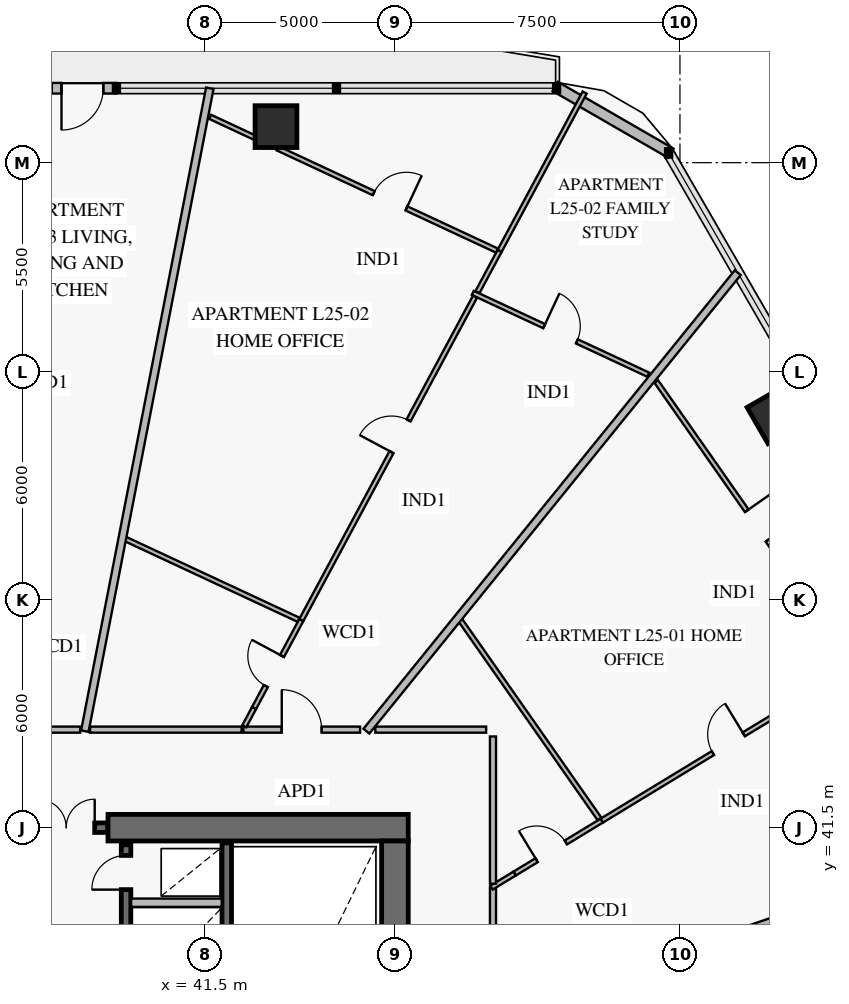
"""IFC4 building model, lengths in metres.
Left out: names, types, materials, properties, quantities, classifications, styles, units other than length and angle.
Written with IfcOpenShell. Run it as: python <this file> out.ifc"""

import sys

from ifc_helpers import new_model, si_unit, direction, frame, frame_2d, origin, origin_2d, place, context, subcontext, project, spatial, rectangle, extrude, element, fill, save


model = new_model("IFC4")
c1 = context("Model", 3, precision=1e-05, world=origin(), true_north=direction((0.0, 1.0)))
c2 = subcontext(c1, "Body", "Model", "MODEL_VIEW")
j1 = project(units=[si_unit("LENGTHUNIT", "METRE"), si_unit("PLANEANGLEUNIT", "RADIAN")], contexts=[c1])
p1 = place(None, origin())
s1 = spatial("IfcSite", under=j1, at=p1, CompositionType="ELEMENT")
p2 = place(p1, origin())
s2 = spatial("IfcBuilding", under=s1, at=p2, CompositionType="ELEMENT")
p3 = place(p2, frame((0.0, 0.0, 103.8)))
s3 = spatial("IfcBuildingStorey", under=s2, at=p3, CompositionType="ELEMENT", Elevation=103.8)
p4 = place(p3, frame((46.85, 41.5, 0.0), z_axis=(0.0, 0.0, 1.0), x_axis=(-1.0, 0.0, 0.0)))
e1 = element("IfcWall", 1, at=p4, inside=s3, PredefinedType="SHEAR", context=c2, shape_type="SweptSolid", body=[
    extrude(rectangle(XDim=7.9, YDim=0.7, at=frame_2d((3.95, 0.0))), origin(), (0.0, 0.0, 1.0), 3.8),
])
p5 = place(p3, frame((46.5, 22.85, 0.0), z_axis=(0.0, 0.0, 1.0), x_axis=(0.0, 1.0, 0.0)))
e2 = element("IfcWall", 2, at=p5, inside=s3, PredefinedType="SHEAR", context=c2, shape_type="SweptSolid", body=[
    extrude(rectangle(XDim=18.3, YDim=0.7, at=frame_2d((9.15, 0.0))), origin(), (0.0, 0.0, 1.0), 3.8),
])
p6 = place(p5, frame((8.9, 0.0, 0.0)))
e3 = element("IfcOpeningElement", 3, at=p6, cuts=e2, PredefinedType="OPENING", context=c2, shape_type="SweptSolid", body=[
    extrude(rectangle(XDim=1.1, YDim=2.15, at=frame_2d((0.55, 1.075))), frame((0.0, 0.362, 0.0), z_axis=(0.0, -1.0, 0.0), x_axis=(1.0, 0.0, 0.0)), (0.0, 0.0, 1.0), 0.724),
])
for number, where, z_axis, x_axis in (
    (4, (56.519, 52.357, 0.0), (0.0, 0.0, 1.0), (-0.5, 0.866, 0.0)),
    (5, (43.37, 59.948, 0.0), (0.0, 0.0, 1.0), (-1.0, 0.0, 0.0)),
):
    element("IfcColumn", number, at=place(p3, frame(where, z_axis=z_axis, x_axis=x_axis)), inside=s3, PredefinedType="COLUMN", context=c2, shape_type="SweptSolid", body=[
        extrude(rectangle(XDim=1.1, YDim=1.1, at=origin_2d()), origin(), (0.0, 0.0, 1.0), 3.55),
    ])
p7 = place(p3, frame((37.381, 60.958, 0.0), z_axis=(0.0, 0.0, 1.0), x_axis=(1.0, 0.0, 0.0)))
e6 = element("IfcWall", 6, at=p7, inside=s3, PredefinedType="SOLIDWALL", context=c2, shape_type="SweptSolid", body=[
    extrude(rectangle(XDim=1.79, YDim=0.28, at=frame_2d((0.895, 0.0))), origin(), (0.0, 0.0, 1.0), 3.55),
])
p8 = place(p7, frame((0.345, 0.0, 0.0)))
e7 = element("IfcOpeningElement", 7, at=p8, cuts=e6, PredefinedType="OPENING", context=c2, shape_type="SweptSolid", body=[
    extrude(rectangle(XDim=1.1, YDim=2.2, at=frame_2d((0.55, 1.1))), frame((0.0, 0.152, 0.0), z_axis=(0.0, -1.0, 0.0), x_axis=(1.0, 0.0, 0.0)), (0.0, 0.0, 1.0), 0.304),
])
p9 = place(p3, frame((50.717, 61.006, 0.0), z_axis=(0.0, 0.0, 1.0), x_axis=(0.866007452331, -0.500031091541, 0.0)))
e8 = element("IfcWall", 8, at=p9, inside=s3, PredefinedType="SOLIDWALL", context=c2, shape_type="SweptSolid", body=[
    extrude(rectangle(XDim=3.515, YDim=0.28, at=frame_2d((1.757, 0.0))), origin(), (0.0, 0.0, 1.0), 3.55),
])
p10 = place(p3, frame((36.76, 41.5, 0.0), z_axis=(0.0, 0.0, 1.0), x_axis=(1.0, 0.0, 0.0)))
e9 = element("IfcWall", 9, at=p10, inside=s3, PredefinedType="SOLIDWALL", context=c2, shape_type="SweptSolid", body=[
    extrude(rectangle(XDim=2.18, YDim=0.25, at=frame_2d((1.09, 0.0))), origin(), (0.0, 0.0, 1.0), 3.8),
])
p11 = place(p10, frame((0.34, 0.0, 0.0)))
e10 = element("IfcOpeningElement", 10, at=p11, cuts=e9, PredefinedType="OPENING", context=c2, shape_type="SweptSolid", body=[
    extrude(rectangle(XDim=1.5, YDim=2.15, at=frame_2d((0.75, 1.075))), frame((0.0, 0.137, 0.0), z_axis=(0.0, -1.0, 0.0), x_axis=(1.0, 0.0, 0.0)), (0.0, 0.0, 1.0), 0.274),
])
p12 = place(p3, frame((42.075, 31.4, 0.0), z_axis=(0.0, 0.0, 1.0), x_axis=(0.0, 1.0, 0.0)))
e11 = element("IfcWall", 11, at=p12, inside=s3, PredefinedType="SOLIDWALL", context=c2, shape_type="SweptSolid", body=[
    extrude(rectangle(XDim=9.7, YDim=0.25, at=frame_2d((4.85, 0.0))), origin(), (0.0, 0.0, 1.0), 3.8),
])
p13 = place(p3, frame((39.425, 31.4, 0.0), z_axis=(0.0, 0.0, 1.0), x_axis=(0.0, 1.0, 0.0)))
e12 = element("IfcWall", 12, at=p13, inside=s3, PredefinedType="SOLIDWALL", context=c2, shape_type="SweptSolid", body=[
    extrude(rectangle(XDim=9.65, YDim=0.25, at=frame_2d((4.825, 0.0))), origin(), (0.0, 0.0, 1.0), 3.8),
])
p14 = place(p13, frame((8.47, 0.0, 0.0)))
e13 = element("IfcOpeningElement", 13, at=p14, cuts=e12, PredefinedType="OPENING", context=c2, shape_type="SweptSolid", body=[
    extrude(rectangle(XDim=0.9, YDim=2.1, at=frame_2d((0.45, 1.05))), frame((0.0, 0.137, 0.0), z_axis=(0.0, -1.0, 0.0), x_axis=(1.0, 0.0, 0.0)), (0.0, 0.0, 1.0), 0.274),
])
p15 = place(p3, frame((49.65, 40.293, 0.0), z_axis=(0.0, 0.0, 1.0), x_axis=(0.854654905255, 0.519196487781, 0.0)))
e14 = element("IfcWall", 14, at=p15, inside=s3, PredefinedType="PARTITIONING", context=c2, shape_type="SweptSolid", body=[
    extrude(rectangle(XDim=2.684, YDim=0.12, at=frame_2d((1.342, 0.0))), origin(), (0.0, 0.0, 1.0), 3.55),
])
p16 = place(p15, frame((0.677, 0.0, 0.0)))
e15 = element("IfcOpeningElement", 15, at=p16, cuts=e14, PredefinedType="OPENING", context=c2, shape_type="SweptSolid", body=[
    extrude(rectangle(XDim=0.9, YDim=2.1, at=frame_2d((0.45, 1.05))), frame((0.0, 0.072, 0.0), z_axis=(0.0, -1.0, 0.0), x_axis=(1.0, 0.0, 0.0)), (0.0, 0.0, 1.0), 0.144),
])
p17 = place(p3, frame((51.944, 41.686, 0.0), z_axis=(0.0, 0.0, 1.0), x_axis=(0.854642479396, 0.519216941569, 0.0)))
e16 = element("IfcWall", 16, at=p17, inside=s3, PredefinedType="PARTITIONING", context=c2, shape_type="SweptSolid", body=[
    extrude(rectangle(XDim=7.843, YDim=0.12, at=frame_2d((3.921, 0.0))), origin(), (0.0, 0.0, 1.0), 3.1),
])
p18 = place(p17, frame((3.421, 0.0, 0.0)))
e17 = element("IfcOpeningElement", 17, at=p18, cuts=e16, PredefinedType="OPENING", context=c2, shape_type="SweptSolid", body=[
    extrude(rectangle(XDim=0.95, YDim=2.1, at=frame_2d((0.475, 1.05))), frame((0.0, 0.072, 0.0), z_axis=(0.0, -1.0, 0.0), x_axis=(1.0, 0.0, 0.0)), (0.0, 0.0, 1.0), 0.144),
])
p19 = place(p3, frame((58.586, 45.801, 0.0), z_axis=(0.0, 0.0, 1.0), x_axis=(-0.573574227098, 0.81915359122, 0.0)))
e18 = element("IfcWall", 18, at=p19, inside=s3, PredefinedType="PARTITIONING", context=c2, shape_type="SweptSolid", body=[
    extrude(rectangle(XDim=9.08, YDim=0.12, at=frame_2d((4.54, 0.0))), origin(), (0.0, 0.0, 1.0), 2.85),
])
p20 = place(p19, frame((3.98, 0.0, 0.0)))
e19 = element("IfcOpeningElement", 19, at=p20, cuts=e18, PredefinedType="OPENING", context=c2, shape_type="SweptSolid", body=[
    extrude(rectangle(XDim=0.95, YDim=2.1, at=frame_2d((0.475, 1.05))), frame((0.0, 0.072, 0.0), z_axis=(0.0, -1.0, 0.0), x_axis=(1.0, 0.0, 0.0)), (0.0, 0.0, 1.0), 0.144),
])
p21 = place(p3, frame((49.08, 36.653, 0.0), z_axis=(0.0, 0.0, 1.0), x_axis=(0.0, 1.0, 0.0)))
e20 = element("IfcWall", 20, at=p21, inside=s3, PredefinedType="PARTITIONING", context=c2, shape_type="SweptSolid", body=[
    extrude(rectangle(XDim=3.27, YDim=0.16, at=frame_2d((1.635, 0.0))), origin(), (0.0, 0.0, 1.0), 3.55),
])
p22 = place(p21, frame((1.11, 0.0, 0.0)))
e21 = element("IfcOpeningElement", 21, at=p22, cuts=e20, PredefinedType="OPENING", context=c2, shape_type="SweptSolid", body=[
    extrude(rectangle(XDim=1.05, YDim=2.15, at=frame_2d((0.525, 1.075))), frame((0.0, 0.092, 0.0), z_axis=(0.0, -1.0, 0.0), x_axis=(1.0, 0.0, 0.0)), (0.0, 0.0, 1.0), 0.184),
])
p23 = place(p3, frame((53.166, 53.42, 0.0), z_axis=(0.0, 0.0, 1.0), x_axis=(-0.906301834907, 0.422631025889, 0.0)))
e22 = element("IfcWall", 22, at=p23, inside=s3, PredefinedType="PARTITIONING", context=c2, shape_type="SweptSolid", body=[
    extrude(rectangle(XDim=5.096, YDim=0.12, at=frame_2d((2.548, 0.0))), origin(), (0.0, 0.0, 1.0), 3.55),
])
p24 = place(p23, frame((2.073, 0.0, 0.0)))
e23 = element("IfcOpeningElement", 23, at=p24, cuts=e22, PredefinedType="OPENING", context=c2, shape_type="SweptSolid", body=[
    extrude(rectangle(XDim=0.95, YDim=2.1, at=frame_2d((0.475, 1.05))), frame((0.0, 0.072, 0.0), z_axis=(0.0, -1.0, 0.0), x_axis=(1.0, 0.0, 0.0)), (0.0, 0.0, 1.0), 0.144),
])
p25 = place(p3, frame((42.794, 44.65, 0.0), z_axis=(0.0, 0.0, 1.0), x_axis=(0.473152013486, 0.880980801229, 0.0)))
e24 = element("IfcWall", 24, at=p25, inside=s3, PredefinedType="PARTITIONING", context=c2, shape_type="SweptSolid", body=[
    extrude(rectangle(XDim=2.627, YDim=0.12, at=frame_2d((1.314, 0.0))), origin(), (0.0, 0.0, 1.0), 3.55),
])
p26 = place(p25, frame((0.654, 0.0, 0.0)))
e25 = element("IfcOpeningElement", 25, at=p26, cuts=e24, PredefinedType="OPENING", context=c2, shape_type="SweptSolid", body=[
    extrude(rectangle(XDim=0.9, YDim=2.1, at=frame_2d((0.45, 1.05))), frame((0.0, 0.072, 0.0), z_axis=(0.0, -1.0, 0.0), x_axis=(1.0, 0.0, 0.0)), (0.0, 0.0, 1.0), 0.144),
])
p27 = place(p3, frame((44.038, 46.965, 0.0), z_axis=(0.0, 0.0, 1.0), x_axis=(0.473145171057, 0.880984476086, 0.0)))
e26 = element("IfcWall", 26, at=p27, inside=s3, PredefinedType="PARTITIONING", context=c2, shape_type="SweptSolid", body=[
    extrude(rectangle(XDim=9.656, YDim=0.12, at=frame_2d((4.828, 0.0))), origin(), (0.0, 0.0, 1.0), 3.1),
])
p28 = place(p27, frame((5.014, 0.0, 0.0)))
e27 = element("IfcOpeningElement", 27, at=p28, cuts=e26, PredefinedType="OPENING", context=c2, shape_type="SweptSolid", body=[
    extrude(rectangle(XDim=0.95, YDim=2.1, at=frame_2d((0.475, 1.05))), frame((0.0, 0.072, 0.0), z_axis=(0.0, -1.0, 0.0), x_axis=(1.0, 0.0, 0.0)), (0.0, 0.0, 1.0), 0.144),
])
p29 = place(p3, frame((48.671, 55.592, 0.0), z_axis=(0.0, 0.0, 1.0), x_axis=(0.473251547015, 0.880927337099, 0.0)))
e28 = element("IfcWall", 28, at=p29, inside=s3, PredefinedType="PARTITIONING", context=c2, shape_type="SweptSolid", body=[
    extrude(rectangle(XDim=1.236, YDim=0.12, at=frame_2d((0.618, 0.0))), origin(), (0.0, 0.0, 1.0), 2.8),
])
p30 = place(p3, frame((49.182, 56.687, 0.0), z_axis=(0.0, 0.0, 1.0), x_axis=(-0.906301625288, 0.422631475402, 0.0)))
e29 = element("IfcWall", 29, at=p30, inside=s3, PredefinedType="PARTITIONING", context=c2, shape_type="SweptSolid", body=[
    extrude(rectangle(XDim=6.368, YDim=0.12, at=frame_2d((3.184, 0.0))), origin(), (0.0, 0.0, 1.0), 2.8),
])
p31 = place(p30, frame((2.625, 0.0, 0.0)))
e30 = element("IfcOpeningElement", 30, at=p31, cuts=e29, PredefinedType="OPENING", context=c2, shape_type="SweptSolid", body=[
    extrude(rectangle(XDim=0.95, YDim=2.1, at=frame_2d((0.475, 1.05))), frame((0.0, 0.072, 0.0), z_axis=(0.0, -1.0, 0.0), x_axis=(1.0, 0.0, 0.0)), (0.0, 0.0, 1.0), 0.144),
])
p32 = place(p3, frame((45.583, 44.08, 0.0), z_axis=(0.0, 0.0, 1.0), x_axis=(-1.0, 0.0, 0.0)))
e31 = element("IfcWall", 31, at=p32, inside=s3, PredefinedType="PARTITIONING", context=c2, shape_type="SweptSolid", body=[
    extrude(rectangle(XDim=3.073, YDim=0.16, at=frame_2d((1.536, 0.0))), origin(), (0.0, 0.0, 1.0), 3.55),
])
p33 = place(p32, frame((1.011, 0.0, 0.0)))
e32 = element("IfcOpeningElement", 32, at=p33, cuts=e31, PredefinedType="OPENING", context=c2, shape_type="SweptSolid", body=[
    extrude(rectangle(XDim=1.05, YDim=2.15, at=frame_2d((0.525, 1.075))), frame((0.0, 0.092, 0.0), z_axis=(0.0, -1.0, 0.0), x_axis=(1.0, 0.0, 0.0)), (0.0, 0.0, 1.0), 0.184),
])
p34 = place(p3, frame((38.219, 44.08, 0.0), z_axis=(0.0, 0.0, 1.0), x_axis=(-1.0, 0.0, 0.0)))
e33 = element("IfcWall", 33, at=p34, inside=s3, PredefinedType="PARTITIONING", context=c2, shape_type="SweptSolid", body=[
    extrude(rectangle(XDim=2.629, YDim=0.16, at=frame_2d((1.314, 0.0))), origin(), (0.0, 0.0, 1.0), 3.55),
])
p35 = place(p34, frame((0.79, 0.0, 0.0)))
e34 = element("IfcOpeningElement", 34, at=p35, cuts=e33, PredefinedType="OPENING", context=c2, shape_type="SweptSolid", body=[
    extrude(rectangle(XDim=1.05, YDim=2.15, at=frame_2d((0.525, 1.075))), frame((0.0, 0.092, 0.0), z_axis=(0.0, -1.0, 0.0), x_axis=(1.0, 0.0, 0.0)), (0.0, 0.0, 1.0), 0.184),
])
p36 = place(p3, frame((39.558, 39.525, 0.0), z_axis=(0.0, 0.0, 1.0), x_axis=(1.0, 0.0, 0.0)))
e35 = element("IfcWall", 35, at=p36, inside=s3, PredefinedType="PARTITIONING", context=c2, shape_type="SweptSolid", body=[
    extrude(rectangle(XDim=2.384, YDim=0.22, at=frame_2d((1.192, 0.0))), origin(), (0.0, 0.0, 1.0), 3.55),
])
p37 = place(p3, frame((49.04, 36.49, 0.0), z_axis=(0.0, 0.0, 1.0), x_axis=(0.945516411569, 0.325574439191, 0.0)))
e36 = element("IfcWall", 36, at=p37, inside=s3, PredefinedType="PARTITIONING", context=c2, shape_type="SweptSolid", body=[
    extrude(rectangle(XDim=15.709, YDim=0.2, at=frame_2d((7.854, 0.0))), origin(), (0.0, 0.0, 1.0), 2.8),
])
p38 = place(p3, frame((49.042, 39.923, 0.0), z_axis=(0.0, 0.0, 1.0), x_axis=(0.854635339674, 0.519228693526, 0.0)))
e37 = element("IfcWall", 37, at=p38, inside=s3, PredefinedType="PARTITIONING", context=c2, shape_type="SweptSolid", body=[
    extrude(rectangle(XDim=0.712, YDim=0.12, at=frame_2d((0.356, 0.0))), origin(), (0.0, 0.0, 1.0), 3.55),
])
p39 = place(p3, frame((51.884, 41.729, 0.0), z_axis=(0.0, 0.0, 1.0), x_axis=(-0.573595462393, 0.819138721782, 0.0)))
e38 = element("IfcWall", 38, at=p39, inside=s3, PredefinedType="PARTITIONING", context=c2, shape_type="SweptSolid", body=[
    extrude(rectangle(XDim=6.4, YDim=0.12, at=frame_2d((3.2, 0.0))), origin(), (0.0, 0.0, 1.0), 2.85),
])
p40 = place(p3, frame((45.75, 44.04, 0.0), z_axis=(0.0, 0.0, 1.0), x_axis=(0.629320806321, 0.777145625177, 0.0)))
e39 = element("IfcWall", 39, at=p40, inside=s3, PredefinedType="PARTITIONING", context=c2, shape_type="SweptSolid", body=[
    extrude(rectangle(XDim=15.526, YDim=0.2, at=frame_2d((7.763, 0.0))), origin(), (0.0, 0.0, 1.0), 2.8),
])
p41 = place(p3, frame((42.535, 44.168, 0.0), z_axis=(0.0, 0.0, 1.0), x_axis=(0.473088148205, 0.881015098638, 0.0)))
e40 = element("IfcWall", 40, at=p41, inside=s3, PredefinedType="PARTITIONING", context=c2, shape_type="SweptSolid", body=[
    extrude(rectangle(XDim=0.547, YDim=0.12, at=frame_2d((0.273, 0.0))), origin(), (0.0, 0.0, 1.0), 3.55),
])
p42 = place(p3, frame((49.256, 56.681, 0.0), z_axis=(0.0, 0.0, 1.0), x_axis=(0.473160047709, 0.880976486209, 0.0)))
e41 = element("IfcWall", 41, at=p42, inside=s3, PredefinedType="PARTITIONING", context=c2, shape_type="SweptSolid", body=[
    extrude(rectangle(XDim=4.726, YDim=0.12, at=frame_2d((2.363, 0.0))), origin(), (0.0, 0.0, 1.0), 3.55),
])
p43 = place(p3, frame((43.964, 46.971, 0.0), z_axis=(0.0, 0.0, 1.0), x_axis=(-0.906312552641, 0.422608041719, 0.0)))
e42 = element("IfcWall", 42, at=p43, inside=s3, PredefinedType="PARTITIONING", context=c2, shape_type="SweptSolid", body=[
    extrude(rectangle(XDim=5.059, YDim=0.12, at=frame_2d((2.529, 0.0))), origin(), (0.0, 0.0, 1.0), 2.85),
])
p44 = place(p3, frame((42.8, 59.664, 0.0), z_axis=(0.0, 0.0, 1.0), x_axis=(-0.906338544202, 0.42255229652, 0.0)))
e43 = element("IfcWall", 43, at=p44, inside=s3, PredefinedType="PARTITIONING", context=c2, shape_type="SweptSolid", body=[
    extrude(rectangle(XDim=1.284, YDim=0.12, at=frame_2d((0.642, 0.0))), origin(), (0.0, 0.0, 1.0), 2.8),
])
p45 = place(p3, frame((38.34, 44.04, 0.0), z_axis=(0.0, 0.0, 1.0), x_axis=(0.190806720502, 0.981627625636, 0.0)))
e44 = element("IfcWall", 44, at=p45, inside=s3, PredefinedType="PARTITIONING", context=c2, shape_type="SweptSolid", body=[
    extrude(rectangle(XDim=17.235, YDim=0.2, at=frame_2d((8.618, 0.0))), origin(), (0.0, 0.0, 1.0), 2.8),
])
p46 = place(p3, frame((49.08, 40.026, 0.0), z_axis=(0.0, 0.0, 1.0), x_axis=(0.0, 1.0, 0.0)))
e45 = element("IfcWall", 45, at=p46, inside=s3, PredefinedType="PARTITIONING", context=c2, shape_type="SweptSolid", body=[
    extrude(rectangle(XDim=3.874, YDim=0.16, at=frame_2d((1.937, 0.0))), origin(), (0.0, 0.0, 1.0), 3.55),
])
p47 = place(p3, frame((48.9, 44.08, 0.0), z_axis=(0.0, 0.0, 1.0), x_axis=(-1.0, 0.0, 0.0)))
e46 = element("IfcWall", 46, at=p47, inside=s3, PredefinedType="PARTITIONING", context=c2, shape_type="SweptSolid", body=[
    extrude(rectangle(XDim=2.916, YDim=0.16, at=frame_2d((1.458, 0.0))), origin(), (0.0, 0.0, 1.0), 2.85),
])
p48 = place(p3, frame((42.465, 44.08, 0.0), z_axis=(0.0, 0.0, 1.0), x_axis=(-1.0, 0.0, 0.0)))
e47 = element("IfcWall", 47, at=p48, inside=s3, PredefinedType="PARTITIONING", context=c2, shape_type="SweptSolid", body=[
    extrude(rectangle(XDim=3.987, YDim=0.16, at=frame_2d((1.994, 0.0))), origin(), (0.0, 0.0, 1.0), 2.85),
])
p49 = place(p8, frame((1.1, 0.0, 0.0), z_axis=(0.0, 0.0, 1.0), x_axis=(-1.0, 0.0, 0.0)))
e48 = element("IfcDoor", 48, at=p49, inside=s3, OperationType="SINGLE_SWING_RIGHT", PredefinedType="DOOR", context=c2, shape_type="SweptSolid", body=[
    extrude(rectangle(XDim=1.1, YDim=2.2, at=frame_2d((0.55, 1.1))), frame((0.0, 0.025, 0.0), z_axis=(0.0, -1.0, 0.0), x_axis=(1.0, 0.0, 0.0)), (0.0, 0.0, 1.0), 0.05),
])
fill(e7, e48)
p50 = place(p11, origin())
e49 = element("IfcDoor", 49, at=p50, inside=s3, OperationType="DOUBLE_DOOR_SINGLE_SWING", PredefinedType="DOOR", context=c2, shape_type="SweptSolid", body=[
    extrude(rectangle(XDim=1.5, YDim=2.15, at=frame_2d((0.75, 1.075))), frame((0.0, 0.025, 0.0), z_axis=(0.0, -1.0, 0.0), x_axis=(1.0, 0.0, 0.0)), (0.0, 0.0, 1.0), 0.05),
])
fill(e10, e49)
p51 = place(p14, origin())
e50 = element("IfcDoor", 50, at=p51, inside=s3, OperationType="SINGLE_SWING_LEFT", PredefinedType="DOOR", context=c2, shape_type="SweptSolid", body=[
    extrude(rectangle(XDim=0.9, YDim=2.1, at=frame_2d((0.45, 1.05))), frame((0.0, 0.025, 0.0), z_axis=(0.0, -1.0, 0.0), x_axis=(1.0, 0.0, 0.0)), (0.0, 0.0, 1.0), 0.05),
])
fill(e13, e50)
p52 = place(p16, origin())
e51 = element("IfcDoor", 51, at=p52, inside=s3, OperationType="SINGLE_SWING_LEFT", PredefinedType="DOOR", context=c2, shape_type="SweptSolid", body=[
    extrude(rectangle(XDim=0.9, YDim=2.1, at=frame_2d((0.45, 1.05))), frame((0.0, 0.025, 0.0), z_axis=(0.0, -1.0, 0.0), x_axis=(1.0, 0.0, 0.0)), (0.0, 0.0, 1.0), 0.05),
])
fill(e15, e51)
p53 = place(p18, origin())
e52 = element("IfcDoor", 52, at=p53, inside=s3, OperationType="SINGLE_SWING_RIGHT", PredefinedType="DOOR", context=c2, shape_type="SweptSolid", body=[
    extrude(rectangle(XDim=0.95, YDim=2.1, at=frame_2d((0.475, 1.05))), frame((0.0, 0.025, 0.0), z_axis=(0.0, -1.0, 0.0), x_axis=(1.0, 0.0, 0.0)), (0.0, 0.0, 1.0), 0.05),
])
fill(e17, e52)
p54 = place(p20, frame((0.95, 0.0, 0.0), z_axis=(0.0, 0.0, 1.0), x_axis=(-1.0, 0.0, 0.0)))
e53 = element("IfcDoor", 53, at=p54, inside=s3, OperationType="SINGLE_SWING_LEFT", PredefinedType="DOOR", context=c2, shape_type="SweptSolid", body=[
    extrude(rectangle(XDim=0.95, YDim=2.1, at=frame_2d((0.475, 1.05))), frame((0.0, 0.025, 0.0), z_axis=(0.0, -1.0, 0.0), x_axis=(1.0, 0.0, 0.0)), (0.0, 0.0, 1.0), 0.05),
])
fill(e19, e53)
p55 = place(p24, frame((0.95, 0.0, 0.0), z_axis=(0.0, 0.0, 1.0), x_axis=(-1.0, 0.0, 0.0)))
e54 = element("IfcDoor", 54, at=p55, inside=s3, OperationType="SINGLE_SWING_LEFT", PredefinedType="DOOR", context=c2, shape_type="SweptSolid", body=[
    extrude(rectangle(XDim=0.95, YDim=2.1, at=frame_2d((0.475, 1.05))), frame((0.0, 0.025, 0.0), z_axis=(0.0, -1.0, 0.0), x_axis=(1.0, 0.0, 0.0)), (0.0, 0.0, 1.0), 0.05),
])
fill(e23, e54)
p56 = place(p26, origin())
e55 = element("IfcDoor", 55, at=p56, inside=s3, OperationType="SINGLE_SWING_RIGHT", PredefinedType="DOOR", context=c2, shape_type="SweptSolid", body=[
    extrude(rectangle(XDim=0.9, YDim=2.1, at=frame_2d((0.45, 1.05))), frame((0.0, 0.025, 0.0), z_axis=(0.0, -1.0, 0.0), x_axis=(1.0, 0.0, 0.0)), (0.0, 0.0, 1.0), 0.05),
])
fill(e25, e55)
p57 = place(p28, origin())
e56 = element("IfcDoor", 56, at=p57, inside=s3, OperationType="SINGLE_SWING_LEFT", PredefinedType="DOOR", context=c2, shape_type="SweptSolid", body=[
    extrude(rectangle(XDim=0.95, YDim=2.1, at=frame_2d((0.475, 1.05))), frame((0.0, 0.025, 0.0), z_axis=(0.0, -1.0, 0.0), x_axis=(1.0, 0.0, 0.0)), (0.0, 0.0, 1.0), 0.05),
])
fill(e27, e56)
p58 = place(p31, frame((0.95, 0.0, 0.0), z_axis=(0.0, 0.0, 1.0), x_axis=(-1.0, 0.0, 0.0)))
e57 = element("IfcDoor", 57, at=p58, inside=s3, OperationType="SINGLE_SWING_RIGHT", PredefinedType="DOOR", context=c2, shape_type="SweptSolid", body=[
    extrude(rectangle(XDim=0.95, YDim=2.1, at=frame_2d((0.475, 1.05))), frame((0.0, 0.025, 0.0), z_axis=(0.0, -1.0, 0.0), x_axis=(1.0, 0.0, 0.0)), (0.0, 0.0, 1.0), 0.05),
])
fill(e30, e57)
p59 = place(p33, frame((1.05, 0.0, 0.0), z_axis=(0.0, 0.0, 1.0), x_axis=(-1.0, 0.0, 0.0)))
e58 = element("IfcDoor", 58, at=p59, inside=s3, OperationType="SINGLE_SWING_LEFT", PredefinedType="DOOR", context=c2, shape_type="SweptSolid", body=[
    extrude(rectangle(XDim=1.05, YDim=2.15, at=frame_2d((0.525, 1.075))), frame((0.0, 0.025, 0.0), z_axis=(0.0, -1.0, 0.0), x_axis=(1.0, 0.0, 0.0)), (0.0, 0.0, 1.0), 0.05),
])
fill(e32, e58)
save(model, sys.argv[1])
